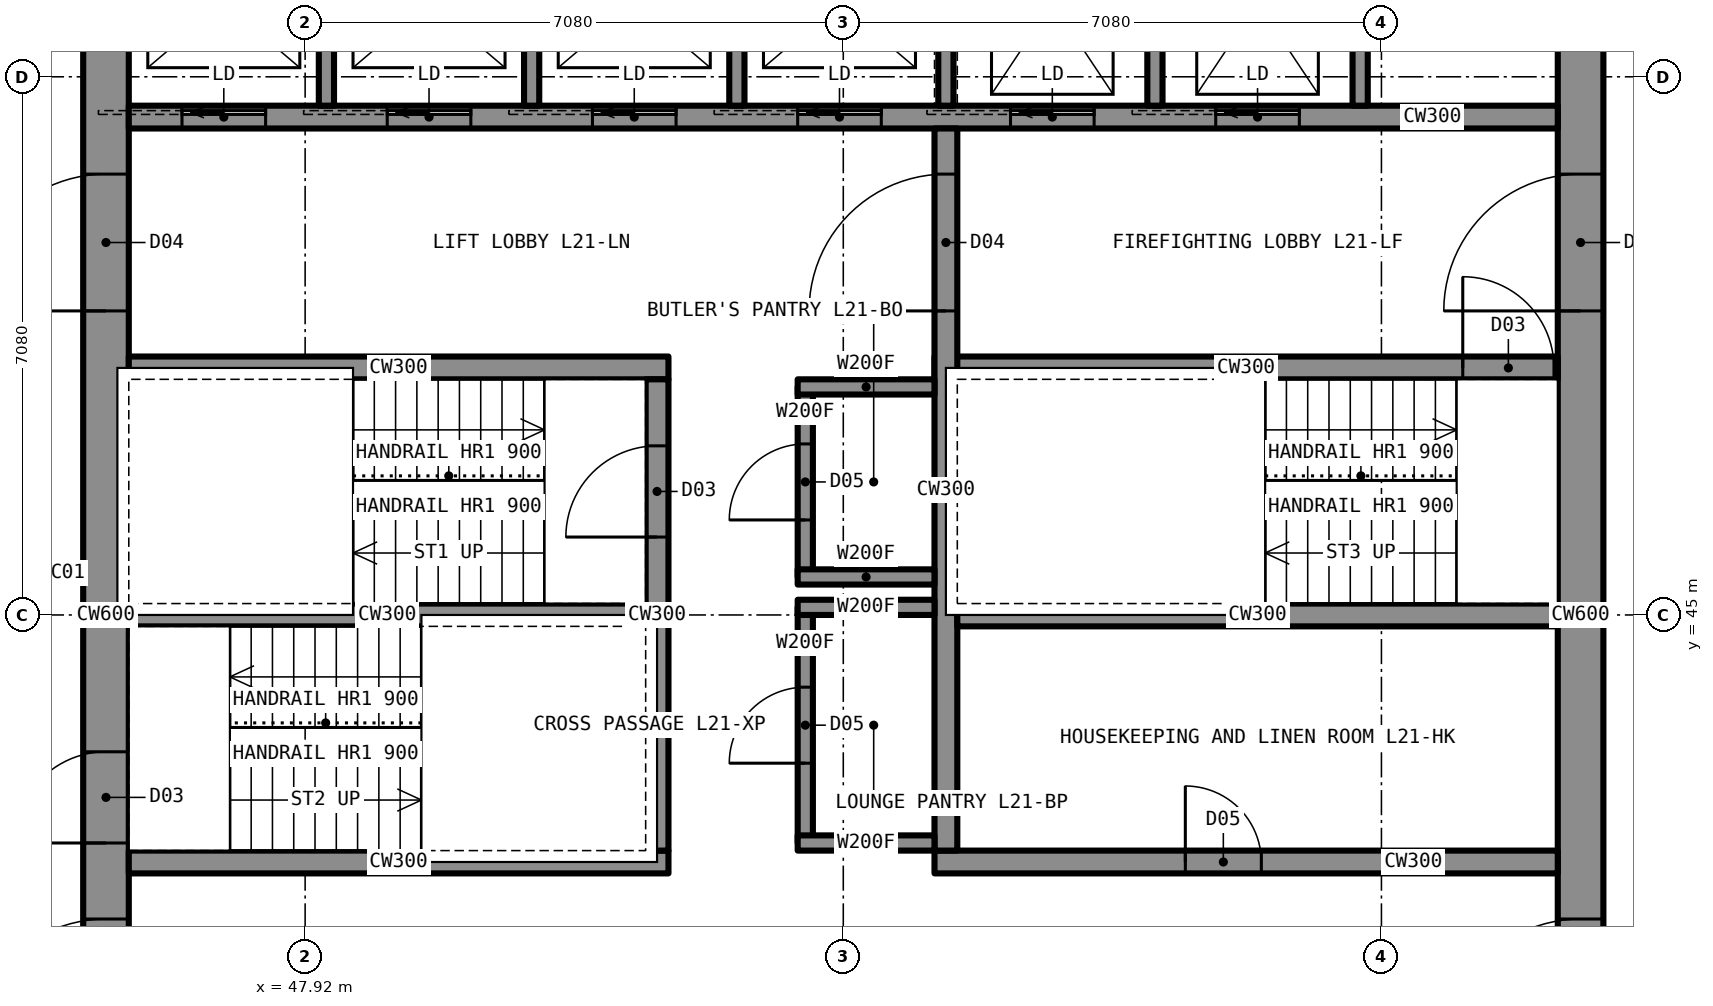
"""IFC4 building model, lengths in metres.
Left out: names, types, materials, properties, quantities, classifications, styles, units other than length and angle.
Written with IfcOpenShell. Run it as: python <this file> out.ifc"""

import sys

from ifc_helpers import new_model, si_unit, direction, frame, frame_2d, origin, place, context, subcontext, project, spatial, rectangle, extrude, element, fill, save


model = new_model("IFC4")
c1 = context("Model", 3, precision=1e-05, world=origin(), true_north=direction((0.0, 1.0)))
c2 = subcontext(c1, "Body", "Model", "MODEL_VIEW")
j1 = project(units=[si_unit("LENGTHUNIT", "METRE"), si_unit("PLANEANGLEUNIT", "RADIAN")], contexts=[c1])
p1 = place(None, origin())
s1 = spatial("IfcSite", under=j1, at=p1, CompositionType="ELEMENT")
p2 = place(p1, origin())
s2 = spatial("IfcBuilding", under=s1, at=p2, CompositionType="ELEMENT")
p3 = place(p2, frame((0.0, 0.0, 81.0)))
s3 = spatial("IfcBuildingStorey", under=s2, at=p3, CompositionType="ELEMENT", Elevation=81.0)
p4 = place(p3, frame((64.7, 35.6, 0.0), z_axis=(0.0, 0.0, 1.0), x_axis=(0.0, 1.0, 0.0)))
e1 = element("IfcWall", 1, at=p4, inside=s3, PredefinedType="SHEAR", context=c2, shape_type="SweptSolid", body=[
    extrude(rectangle(XDim=18.8, YDim=0.6, at=frame_2d((9.4, 0.0))), origin(), (0.0, 0.0, 1.0), 3.5),
])
p5 = place(p4, frame((13.4, 0.0, 0.0)))
e2 = element("IfcOpeningElement", 2, at=p5, cuts=e1, PredefinedType="OPENING", context=c2, shape_type="SweptSolid", body=[
    extrude(rectangle(XDim=1.8, YDim=2.2, at=frame_2d((0.9, 1.1))), frame((0.0, 0.31, 0.0), z_axis=(0.0, -1.0, 0.0), x_axis=(1.0, 0.0, 0.0)), (0.0, 0.0, 1.0), 0.62),
])
p6 = place(p4, frame((3.6, 0.0, 0.0)))
e3 = element("IfcOpeningElement", 3, at=p6, cuts=e1, PredefinedType="OPENING", context=c2, shape_type="SweptSolid", body=[
    extrude(rectangle(XDim=1.8, YDim=2.2, at=frame_2d((0.9, 1.1))), frame((0.0, 0.31, 0.0), z_axis=(0.0, -1.0, 0.0), x_axis=(1.0, 0.0, 0.0)), (0.0, 0.0, 1.0), 0.62),
])
p7 = place(p3, frame((45.3, 35.6, 0.0), z_axis=(0.0, 0.0, 1.0), x_axis=(0.0, 1.0, 0.0)))
e4 = element("IfcWall", 4, at=p7, inside=s3, PredefinedType="SHEAR", context=c2, shape_type="SweptSolid", body=[
    extrude(rectangle(XDim=18.8, YDim=0.6, at=frame_2d((9.4, 0.0))), origin(), (0.0, 0.0, 1.0), 3.5),
])
p8 = place(p7, frame((13.4, 0.0, 0.0)))
e5 = element("IfcOpeningElement", 5, at=p8, cuts=e4, PredefinedType="OPENING", context=c2, shape_type="SweptSolid", body=[
    extrude(rectangle(XDim=1.8, YDim=2.2, at=frame_2d((0.9, 1.1))), frame((0.0, 0.31, 0.0), z_axis=(0.0, -1.0, 0.0), x_axis=(1.0, 0.0, 0.0)), (0.0, 0.0, 1.0), 0.62),
])
p9 = place(p7, frame((3.6, 0.0, 0.0)))
e6 = element("IfcOpeningElement", 6, at=p9, cuts=e4, PredefinedType="OPENING", context=c2, shape_type="SweptSolid", body=[
    extrude(rectangle(XDim=1.8, YDim=2.2, at=frame_2d((0.9, 1.1))), frame((0.0, 0.31, 0.0), z_axis=(0.0, -1.0, 0.0), x_axis=(1.0, 0.0, 0.0)), (0.0, 0.0, 1.0), 0.62),
])
p10 = place(p7, frame((6.4, 0.0, 0.0)))
e7 = element("IfcOpeningElement", 7, at=p10, cuts=e4, PredefinedType="OPENING", context=c2, shape_type="SweptSolid", body=[
    extrude(rectangle(XDim=1.2, YDim=2.2, at=frame_2d((0.6, 1.1))), frame((0.0, 0.31, 0.0), z_axis=(0.0, -1.0, 0.0), x_axis=(1.0, 0.0, 0.0)), (0.0, 0.0, 1.0), 0.62),
])
p11 = place(p3, frame((45.6, 51.55, 0.0), z_axis=(0.0, 0.0, 1.0), x_axis=(1.0, 0.0, 0.0)))
e8 = element("IfcWall", 8, at=p11, inside=s3, PredefinedType="SHEAR", context=c2, shape_type="SweptSolid", body=[
    extrude(rectangle(XDim=18.8, YDim=0.3, at=frame_2d((9.4, 0.0))), origin(), (0.0, 0.0, 1.0), 3.5),
])
p12 = place(p11, frame((0.7, 0.0, 0.0)))
e9 = element("IfcOpeningElement", 9, at=p12, cuts=e8, PredefinedType="OPENING", context=c2, shape_type="SweptSolid", body=[
    extrude(rectangle(XDim=1.1, YDim=2.2, at=frame_2d((0.55, 1.1))), frame((0.0, 0.16, 0.0), z_axis=(0.0, -1.0, 0.0), x_axis=(1.0, 0.0, 0.0)), (0.0, 0.0, 1.0), 0.32),
])
p13 = place(p11, frame((3.4, 0.0, 0.0)))
e10 = element("IfcOpeningElement", 10, at=p13, cuts=e8, PredefinedType="OPENING", context=c2, shape_type="SweptSolid", body=[
    extrude(rectangle(XDim=1.1, YDim=2.2, at=frame_2d((0.55, 1.1))), frame((0.0, 0.16, 0.0), z_axis=(0.0, -1.0, 0.0), x_axis=(1.0, 0.0, 0.0)), (0.0, 0.0, 1.0), 0.32),
])
p14 = place(p11, frame((6.1, 0.0, 0.0)))
e11 = element("IfcOpeningElement", 11, at=p14, cuts=e8, PredefinedType="OPENING", context=c2, shape_type="SweptSolid", body=[
    extrude(rectangle(XDim=1.1, YDim=2.2, at=frame_2d((0.55, 1.1))), frame((0.0, 0.16, 0.0), z_axis=(0.0, -1.0, 0.0), x_axis=(1.0, 0.0, 0.0)), (0.0, 0.0, 1.0), 0.32),
])
p15 = place(p11, frame((8.8, 0.0, 0.0)))
e12 = element("IfcOpeningElement", 12, at=p15, cuts=e8, PredefinedType="OPENING", context=c2, shape_type="SweptSolid", body=[
    extrude(rectangle(XDim=1.1, YDim=2.2, at=frame_2d((0.55, 1.1))), frame((0.0, 0.16, 0.0), z_axis=(0.0, -1.0, 0.0), x_axis=(1.0, 0.0, 0.0)), (0.0, 0.0, 1.0), 0.32),
])
p16 = place(p11, frame((11.6, 0.0, 0.0)))
e13 = element("IfcOpeningElement", 13, at=p16, cuts=e8, PredefinedType="OPENING", context=c2, shape_type="SweptSolid", body=[
    extrude(rectangle(XDim=1.1, YDim=2.2, at=frame_2d((0.55, 1.1))), frame((0.0, 0.16, 0.0), z_axis=(0.0, -1.0, 0.0), x_axis=(1.0, 0.0, 0.0)), (0.0, 0.0, 1.0), 0.32),
])
p17 = place(p11, frame((14.3, 0.0, 0.0)))
e14 = element("IfcOpeningElement", 14, at=p17, cuts=e8, PredefinedType="OPENING", context=c2, shape_type="SweptSolid", body=[
    extrude(rectangle(XDim=1.1, YDim=2.2, at=frame_2d((0.55, 1.1))), frame((0.0, 0.16, 0.0), z_axis=(0.0, -1.0, 0.0), x_axis=(1.0, 0.0, 0.0)), (0.0, 0.0, 1.0), 0.32),
])
p18 = place(p3, frame((45.6, 48.25, 0.0), z_axis=(0.0, 0.0, 1.0), x_axis=(1.0, 0.0, 0.0)))
e15 = element("IfcWall", 15, at=p18, inside=s3, PredefinedType="SHEAR", context=c2, shape_type="SweptSolid", body=[
    extrude(rectangle(XDim=7.1, YDim=0.3, at=frame_2d((3.55, 0.0))), origin(), (0.0, 0.0, 1.0), 3.5),
])
p19 = place(p3, frame((56.2, 48.25, 0.0), z_axis=(0.0, 0.0, 1.0), x_axis=(1.0, 0.0, 0.0)))
e16 = element("IfcWall", 16, at=p19, inside=s3, PredefinedType="SHEAR", context=c2, shape_type="SweptSolid", body=[
    extrude(rectangle(XDim=8.2, YDim=0.3, at=frame_2d((4.1, 0.0))), origin(), (0.0, 0.0, 1.0), 3.5),
])
p20 = place(p19, frame((6.95, 0.0, 0.0)))
e17 = element("IfcOpeningElement", 17, at=p20, cuts=e16, PredefinedType="OPENING", context=c2, shape_type="SweptSolid", body=[
    extrude(rectangle(XDim=1.2, YDim=2.2, at=frame_2d((0.6, 1.1))), frame((0.0, 0.16, 0.0), z_axis=(0.0, -1.0, 0.0), x_axis=(1.0, 0.0, 0.0)), (0.0, 0.0, 1.0), 0.32),
])
p21 = place(p3, frame((45.6, 41.75, 0.0), z_axis=(0.0, 0.0, 1.0), x_axis=(1.0, 0.0, 0.0)))
e18 = element("IfcWall", 18, at=p21, inside=s3, PredefinedType="SHEAR", context=c2, shape_type="SweptSolid", body=[
    extrude(rectangle(XDim=7.1, YDim=0.3, at=frame_2d((3.55, 0.0))), origin(), (0.0, 0.0, 1.0), 3.5),
])
p22 = place(p3, frame((56.2, 41.75, 0.0), z_axis=(0.0, 0.0, 1.0), x_axis=(1.0, 0.0, 0.0)))
e19 = element("IfcWall", 19, at=p22, inside=s3, PredefinedType="SHEAR", context=c2, shape_type="SweptSolid", body=[
    extrude(rectangle(XDim=8.2, YDim=0.3, at=frame_2d((4.1, 0.0))), origin(), (0.0, 0.0, 1.0), 3.5),
])
p23 = place(p22, frame((3.3, 0.0, 0.0)))
e20 = element("IfcOpeningElement", 20, at=p23, cuts=e19, PredefinedType="OPENING", context=c2, shape_type="SweptSolid", body=[
    extrude(rectangle(XDim=1.0, YDim=2.1, at=frame_2d((0.5, 1.05))), frame((0.0, 0.16, 0.0), z_axis=(0.0, -1.0, 0.0), x_axis=(1.0, 0.0, 0.0)), (0.0, 0.0, 1.0), 0.32),
])
p24 = place(p3, frame((52.55, 41.9, 0.0), z_axis=(0.0, 0.0, 1.0), x_axis=(0.0, 1.0, 0.0)))
e21 = element("IfcWall", 21, at=p24, inside=s3, PredefinedType="SHEAR", context=c2, shape_type="SweptSolid", body=[
    extrude(rectangle(XDim=6.2, YDim=0.3, at=frame_2d((3.1, 0.0))), origin(), (0.0, 0.0, 1.0), 3.5),
])
p25 = place(p24, frame((4.125, 0.0, 0.0)))
e22 = element("IfcOpeningElement", 22, at=p25, cuts=e21, PredefinedType="OPENING", context=c2, shape_type="SweptSolid", body=[
    extrude(rectangle(XDim=1.2, YDim=2.2, at=frame_2d((0.6, 1.1))), frame((0.0, 0.16, 0.0), z_axis=(0.0, -1.0, 0.0), x_axis=(1.0, 0.0, 0.0)), (0.0, 0.0, 1.0), 0.32),
])
p26 = place(p3, frame((56.35, 41.9, 0.0), z_axis=(0.0, 0.0, 1.0), x_axis=(0.0, 1.0, 0.0)))
e23 = element("IfcWall", 23, at=p26, inside=s3, PredefinedType="SHEAR", context=c2, shape_type="SweptSolid", body=[
    extrude(rectangle(XDim=9.5, YDim=0.3, at=frame_2d((4.75, 0.0))), origin(), (0.0, 0.0, 1.0), 3.5),
])
p27 = place(p26, frame((7.1, 0.0, 0.0)))
e24 = element("IfcOpeningElement", 24, at=p27, cuts=e23, PredefinedType="OPENING", context=c2, shape_type="SweptSolid", body=[
    extrude(rectangle(XDim=1.8, YDim=2.2, at=frame_2d((0.9, 1.1))), frame((0.0, 0.16, 0.0), z_axis=(0.0, -1.0, 0.0), x_axis=(1.0, 0.0, 0.0)), (0.0, 0.0, 1.0), 0.32),
])
p28 = place(p3, frame((45.6, 45.0, 0.0), z_axis=(0.0, 0.0, 1.0), x_axis=(1.0, 0.0, 0.0)))
e25 = element("IfcWall", 25, at=p28, inside=s3, PredefinedType="SHEAR", context=c2, shape_type="SweptSolid", body=[
    extrude(rectangle(XDim=6.8, YDim=0.3, at=frame_2d((3.4, 0.0))), origin(), (0.0, 0.0, 1.0), 3.5),
])
p29 = place(p3, frame((56.5, 45.0, 0.0), z_axis=(0.0, 0.0, 1.0), x_axis=(1.0, 0.0, 0.0)))
e26 = element("IfcWall", 26, at=p29, inside=s3, PredefinedType="SHEAR", context=c2, shape_type="SweptSolid", body=[
    extrude(rectangle(XDim=7.9, YDim=0.3, at=frame_2d((3.95, 0.0))), origin(), (0.0, 0.0, 1.0), 3.5),
])
p30 = place(p3, frame((54.5, 42.0, 0.0), z_axis=(0.0, 0.0, 1.0), x_axis=(0.0, 1.0, 0.0)))
e27 = element("IfcWall", 27, at=p30, inside=s3, PredefinedType="PARTITIONING", context=c2, shape_type="SweptSolid", body=[
    extrude(rectangle(XDim=3.1, YDim=0.2, at=frame_2d((1.55, 0.0))), origin(), (0.0, 0.0, 1.0), 3.33),
])
p31 = place(p30, frame((1.05, 0.0, 0.0)))
e28 = element("IfcOpeningElement", 28, at=p31, cuts=e27, PredefinedType="OPENING", context=c2, shape_type="SweptSolid", body=[
    extrude(rectangle(XDim=1.0, YDim=2.1, at=frame_2d((0.5, 1.05))), frame((0.0, 0.11, 0.0), z_axis=(0.0, -1.0, 0.0), x_axis=(1.0, 0.0, 0.0)), (0.0, 0.0, 1.0), 0.22),
])
for number, where, z_axis, x_axis in (
    (29, (54.4, 42.0, 0.0), (0.0, 0.0, 1.0), (1.0, 0.0, 0.0)),
    (30, (54.4, 45.1, 0.0), (0.0, 0.0, 1.0), (1.0, 0.0, 0.0)),
):
    element("IfcWall", number, at=place(p3, frame(where, z_axis=z_axis, x_axis=x_axis)), inside=s3, PredefinedType="PARTITIONING", context=c2, shape_type="SweptSolid", body=[
        extrude(rectangle(XDim=1.8, YDim=0.2, at=frame_2d((0.9, 0.0))), origin(), (0.0, 0.0, 1.0), 3.33),
    ])
p32 = place(p3, frame((54.5, 45.5, 0.0), z_axis=(0.0, 0.0, 1.0), x_axis=(0.0, 1.0, 0.0)))
e31 = element("IfcWall", 31, at=p32, inside=s3, PredefinedType="PARTITIONING", context=c2, shape_type="SweptSolid", body=[
    extrude(rectangle(XDim=2.5, YDim=0.2, at=frame_2d((1.25, 0.0))), origin(), (0.0, 0.0, 1.0), 3.33),
])
p33 = place(p32, frame((0.75, 0.0, 0.0)))
e32 = element("IfcOpeningElement", 32, at=p33, cuts=e31, PredefinedType="OPENING", context=c2, shape_type="SweptSolid", body=[
    extrude(rectangle(XDim=1.0, YDim=2.1, at=frame_2d((0.5, 1.05))), frame((0.0, 0.11, 0.0), z_axis=(0.0, -1.0, 0.0), x_axis=(1.0, 0.0, 0.0)), (0.0, 0.0, 1.0), 0.22),
])
for number, where, z_axis, x_axis in (
    (33, (54.4, 45.5, 0.0), (0.0, 0.0, 1.0), (1.0, 0.0, 0.0)),
    (34, (54.4, 48.0, 0.0), (0.0, 0.0, 1.0), (1.0, 0.0, 0.0)),
):
    element("IfcWall", number, at=place(p3, frame(where, z_axis=z_axis, x_axis=x_axis)), inside=s3, PredefinedType="PARTITIONING", context=c2, shape_type="SweptSolid", body=[
        extrude(rectangle(XDim=1.8, YDim=0.2, at=frame_2d((0.9, 0.0))), origin(), (0.0, 0.0, 1.0), 3.33),
    ])
for number, where, z_axis, x_axis in (
    (35, (48.2, 51.7, 0.0), (0.0, 0.0, 1.0), (0.0, 1.0, 0.0)),
    (36, (50.9, 51.7, 0.0), (0.0, 0.0, 1.0), (0.0, 1.0, 0.0)),
    (37, (53.6, 51.7, 0.0), (0.0, 0.0, 1.0), (0.0, 1.0, 0.0)),
    (38, (59.1, 51.7, 0.0), (0.0, 0.0, 1.0), (0.0, 1.0, 0.0)),
    (39, (61.8, 51.7, 0.0), (0.0, 0.0, 1.0), (0.0, 1.0, 0.0)),
    (40, (56.35, 51.7, 0.0), (0.0, 0.0, 1.0), (0.0, 1.0, 0.0)),
):
    element("IfcWall", number, at=place(p3, frame(where, z_axis=z_axis, x_axis=x_axis)), inside=s3, PredefinedType="PARTITIONING", context=c2, shape_type="SweptSolid", body=[
        extrude(rectangle(XDim=2.7, YDim=0.2, at=frame_2d((1.35, 0.0))), origin(), (0.0, 0.0, 1.0), 3.33),
    ])
p34 = place(p31, origin())
e41 = element("IfcDoor", 41, at=p34, inside=s3, OperationType="SINGLE_SWING_LEFT", PredefinedType="DOOR", context=c2, shape_type="SweptSolid", body=[
    extrude(rectangle(XDim=1.0, YDim=2.1, at=frame_2d((0.5, 1.05))), frame((0.0, 0.025, 0.0), z_axis=(0.0, -1.0, 0.0), x_axis=(1.0, 0.0, 0.0)), (0.0, 0.0, 1.0), 0.05),
])
fill(e28, e41)
p35 = place(p33, origin())
e42 = element("IfcDoor", 42, at=p35, inside=s3, OperationType="SINGLE_SWING_LEFT", PredefinedType="DOOR", context=c2, shape_type="SweptSolid", body=[
    extrude(rectangle(XDim=1.0, YDim=2.1, at=frame_2d((0.5, 1.05))), frame((0.0, 0.025, 0.0), z_axis=(0.0, -1.0, 0.0), x_axis=(1.0, 0.0, 0.0)), (0.0, 0.0, 1.0), 0.05),
])
fill(e32, e42)
p36 = place(p8, origin())
e43 = element("IfcDoor", 43, at=p36, inside=s3, OperationType="DOUBLE_DOOR_SINGLE_SWING", PredefinedType="DOOR", context=c2, shape_type="SweptSolid", body=[
    extrude(rectangle(XDim=1.8, YDim=2.2, at=frame_2d((0.9, 1.1))), frame((0.0, 0.025, 0.0), z_axis=(0.0, -1.0, 0.0), x_axis=(1.0, 0.0, 0.0)), (0.0, 0.0, 1.0), 0.05),
])
fill(e5, e43)
p37 = place(p9, origin())
e44 = element("IfcDoor", 44, at=p37, inside=s3, OperationType="DOUBLE_DOOR_SINGLE_SWING", PredefinedType="DOOR", context=c2, shape_type="SweptSolid", body=[
    extrude(rectangle(XDim=1.8, YDim=2.2, at=frame_2d((0.9, 1.1))), frame((0.0, 0.025, 0.0), z_axis=(0.0, -1.0, 0.0), x_axis=(1.0, 0.0, 0.0)), (0.0, 0.0, 1.0), 0.05),
])
fill(e6, e44)
p38 = place(p5, origin())
e45 = element("IfcDoor", 45, at=p38, inside=s3, OperationType="DOUBLE_DOOR_SINGLE_SWING", PredefinedType="DOOR", context=c2, shape_type="SweptSolid", body=[
    extrude(rectangle(XDim=1.8, YDim=2.2, at=frame_2d((0.9, 1.1))), frame((0.0, 0.025, 0.0), z_axis=(0.0, -1.0, 0.0), x_axis=(1.0, 0.0, 0.0)), (0.0, 0.0, 1.0), 0.05),
])
fill(e2, e45)
p39 = place(p6, origin())
e46 = element("IfcDoor", 46, at=p39, inside=s3, OperationType="DOUBLE_DOOR_SINGLE_SWING", PredefinedType="DOOR", context=c2, shape_type="SweptSolid", body=[
    extrude(rectangle(XDim=1.8, YDim=2.2, at=frame_2d((0.9, 1.1))), frame((0.0, 0.025, 0.0), z_axis=(0.0, -1.0, 0.0), x_axis=(1.0, 0.0, 0.0)), (0.0, 0.0, 1.0), 0.05),
])
fill(e3, e46)
p40 = place(p27, origin())
e47 = element("IfcDoor", 47, at=p40, inside=s3, OperationType="DOUBLE_DOOR_SINGLE_SWING", PredefinedType="DOOR", context=c2, shape_type="SweptSolid", body=[
    extrude(rectangle(XDim=1.8, YDim=2.2, at=frame_2d((0.9, 1.1))), frame((0.0, 0.025, 0.0), z_axis=(0.0, -1.0, 0.0), x_axis=(1.0, 0.0, 0.0)), (0.0, 0.0, 1.0), 0.05),
])
fill(e24, e47)
p41 = place(p25, origin())
e48 = element("IfcDoor", 48, at=p41, inside=s3, OperationType="SINGLE_SWING_LEFT", PredefinedType="DOOR", context=c2, shape_type="SweptSolid", body=[
    extrude(rectangle(XDim=1.2, YDim=2.2, at=frame_2d((0.6, 1.1))), frame((0.0, 0.025, 0.0), z_axis=(0.0, -1.0, 0.0), x_axis=(1.0, 0.0, 0.0)), (0.0, 0.0, 1.0), 0.05),
])
fill(e22, e48)
p42 = place(p10, origin())
e49 = element("IfcDoor", 49, at=p42, inside=s3, OperationType="SINGLE_SWING_LEFT", PredefinedType="DOOR", context=c2, shape_type="SweptSolid", body=[
    extrude(rectangle(XDim=1.2, YDim=2.2, at=frame_2d((0.6, 1.1))), frame((0.0, 0.025, 0.0), z_axis=(0.0, -1.0, 0.0), x_axis=(1.0, 0.0, 0.0)), (0.0, 0.0, 1.0), 0.05),
])
fill(e7, e49)
p43 = place(p20, origin())
e50 = element("IfcDoor", 50, at=p43, inside=s3, OperationType="SINGLE_SWING_LEFT", PredefinedType="DOOR", context=c2, shape_type="SweptSolid", body=[
    extrude(rectangle(XDim=1.2, YDim=2.2, at=frame_2d((0.6, 1.1))), frame((0.0, 0.025, 0.0), z_axis=(0.0, -1.0, 0.0), x_axis=(1.0, 0.0, 0.0)), (0.0, 0.0, 1.0), 0.05),
])
fill(e17, e50)
p44 = place(p23, origin())
e51 = element("IfcDoor", 51, at=p44, inside=s3, OperationType="SINGLE_SWING_LEFT", PredefinedType="DOOR", context=c2, shape_type="SweptSolid", body=[
    extrude(rectangle(XDim=1.0, YDim=2.1, at=frame_2d((0.5, 1.05))), frame((0.0, 0.025, 0.0), z_axis=(0.0, -1.0, 0.0), x_axis=(1.0, 0.0, 0.0)), (0.0, 0.0, 1.0), 0.05),
])
fill(e20, e51)
p45 = place(p12, origin())
e52 = element("IfcDoor", 52, at=p45, inside=s3, OperationType="SLIDING_TO_LEFT", PredefinedType="DOOR", context=c2, shape_type="SweptSolid", body=[
    extrude(rectangle(XDim=1.1, YDim=2.2, at=frame_2d((0.55, 1.1))), frame((0.0, 0.025, 0.0), z_axis=(0.0, -1.0, 0.0), x_axis=(1.0, 0.0, 0.0)), (0.0, 0.0, 1.0), 0.05),
])
fill(e9, e52)
p46 = place(p13, origin())
e53 = element("IfcDoor", 53, at=p46, inside=s3, OperationType="SLIDING_TO_LEFT", PredefinedType="DOOR", context=c2, shape_type="SweptSolid", body=[
    extrude(rectangle(XDim=1.1, YDim=2.2, at=frame_2d((0.55, 1.1))), frame((0.0, 0.025, 0.0), z_axis=(0.0, -1.0, 0.0), x_axis=(1.0, 0.0, 0.0)), (0.0, 0.0, 1.0), 0.05),
])
fill(e10, e53)
p47 = place(p14, origin())
e54 = element("IfcDoor", 54, at=p47, inside=s3, OperationType="SLIDING_TO_LEFT", PredefinedType="DOOR", context=c2, shape_type="SweptSolid", body=[
    extrude(rectangle(XDim=1.1, YDim=2.2, at=frame_2d((0.55, 1.1))), frame((0.0, 0.025, 0.0), z_axis=(0.0, -1.0, 0.0), x_axis=(1.0, 0.0, 0.0)), (0.0, 0.0, 1.0), 0.05),
])
fill(e11, e54)
p48 = place(p15, origin())
e55 = element("IfcDoor", 55, at=p48, inside=s3, OperationType="SLIDING_TO_LEFT", PredefinedType="DOOR", context=c2, shape_type="SweptSolid", body=[
    extrude(rectangle(XDim=1.1, YDim=2.2, at=frame_2d((0.55, 1.1))), frame((0.0, 0.025, 0.0), z_axis=(0.0, -1.0, 0.0), x_axis=(1.0, 0.0, 0.0)), (0.0, 0.0, 1.0), 0.05),
])
fill(e12, e55)
p49 = place(p16, origin())
e56 = element("IfcDoor", 56, at=p49, inside=s3, OperationType="SLIDING_TO_LEFT", PredefinedType="DOOR", context=c2, shape_type="SweptSolid", body=[
    extrude(rectangle(XDim=1.1, YDim=2.2, at=frame_2d((0.55, 1.1))), frame((0.0, 0.025, 0.0), z_axis=(0.0, -1.0, 0.0), x_axis=(1.0, 0.0, 0.0)), (0.0, 0.0, 1.0), 0.05),
])
fill(e13, e56)
p50 = place(p17, origin())
e57 = element("IfcDoor", 57, at=p50, inside=s3, OperationType="SLIDING_TO_LEFT", PredefinedType="DOOR", context=c2, shape_type="SweptSolid", body=[
    extrude(rectangle(XDim=1.1, YDim=2.2, at=frame_2d((0.55, 1.1))), frame((0.0, 0.025, 0.0), z_axis=(0.0, -1.0, 0.0), x_axis=(1.0, 0.0, 0.0)), (0.0, 0.0, 1.0), 0.05),
])
fill(e14, e57)
save(model, sys.argv[1])
